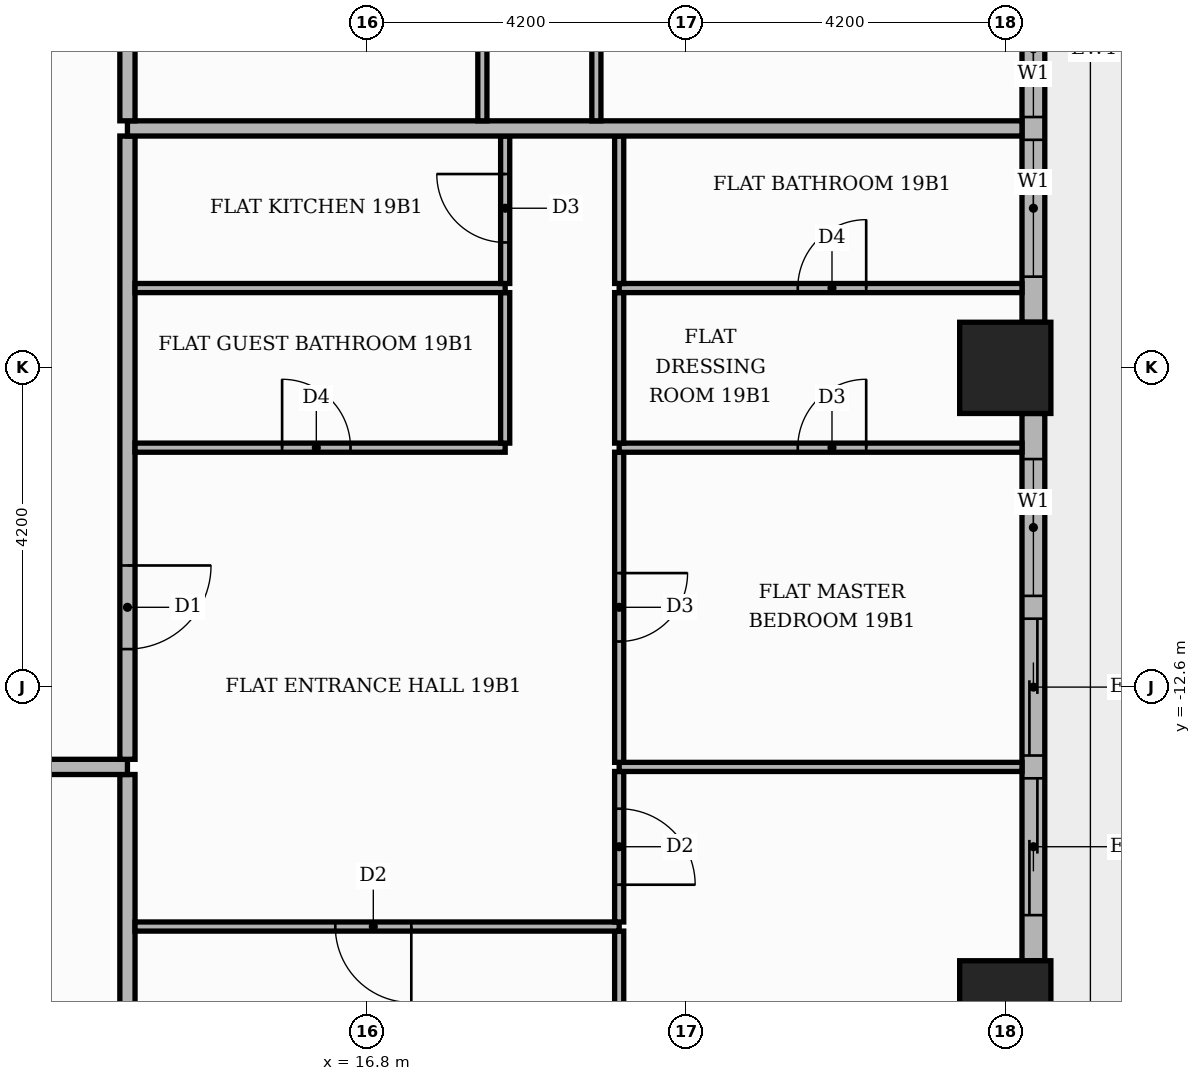
"""IFC4 building model, lengths in metres.
Left out: names, types, materials, properties, quantities, classifications, styles, units other than length and angle.
Written with IfcOpenShell. Run it as: python <this file> out.ifc"""

import sys

from ifc_helpers import new_model, si_unit, direction, frame, frame_2d, origin, origin_2d, place, context, subcontext, project, spatial, rectangle, extrude, element, fill, save


model = new_model("IFC4")
c1 = context("Model", 3, precision=1e-05, world=origin(), true_north=direction((0.0, 1.0)))
c2 = subcontext(c1, "Body", "Model", "MODEL_VIEW")
j1 = project(units=[si_unit("LENGTHUNIT", "METRE"), si_unit("PLANEANGLEUNIT", "RADIAN")], contexts=[c1])
p1 = place(None, origin())
s1 = spatial("IfcSite", under=j1, at=p1, CompositionType="ELEMENT")
p2 = place(p1, origin())
s2 = spatial("IfcBuilding", under=s1, at=p2, CompositionType="ELEMENT")
p3 = place(p2, frame((0.0, 0.0, 83.1)))
s3 = spatial("IfcBuildingStorey", under=s2, at=p3, CompositionType="ELEMENT", Elevation=83.1)
for number, where, z_axis, x_axis in (
    (1, (25.2, -8.4, 0.0), (0.0, 0.0, 1.0), (1.0, 0.0, 0.0)),
    (2, (25.2, -16.8, 0.0), (0.0, 0.0, 1.0), (1.0, 0.0, 0.0)),
):
    element("IfcColumn", number, at=place(p3, frame(where, z_axis=z_axis, x_axis=x_axis)), inside=s3, PredefinedType="COLUMN", context=c2, shape_type="SweptSolid", body=[
        extrude(rectangle(XDim=1.2, YDim=1.2, at=origin_2d()), origin(), (0.0, 0.0, 1.0), 3.9),
    ])
p4 = place(p3, frame((25.57, -16.2, 0.0), z_axis=(0.0, 0.0, 1.0), x_axis=(0.0, 1.0, 0.0)))
e3 = element("IfcWall", 3, at=p4, inside=s3, PredefinedType="STANDARD", context=c2, shape_type="SweptSolid", body=[
    extrude(rectangle(XDim=7.2, YDim=0.3, at=frame_2d((3.6, 0.0))), origin(), (0.0, 0.0, 1.0), 3.48),
])
p5 = place(p4, frame((0.6, 0.0, 0.0)))
e4 = element("IfcOpeningElement", 4, at=p5, cuts=e3, PredefinedType="OPENING", context=c2, shape_type="SweptSolid", body=[
    extrude(rectangle(XDim=1.8, YDim=2.4, at=frame_2d((0.9, 1.2))), frame((0.0, 0.16, 0.0), z_axis=(0.0, -1.0, 0.0), x_axis=(1.0, 0.0, 0.0)), (0.0, 0.0, 1.0), 0.32),
])
p6 = place(p4, frame((2.7, 0.0, 0.0)))
e5 = element("IfcOpeningElement", 5, at=p6, cuts=e3, PredefinedType="OPENING", context=c2, shape_type="SweptSolid", body=[
    extrude(rectangle(XDim=1.8, YDim=2.4, at=frame_2d((0.9, 1.2))), frame((0.0, 0.16, 0.0), z_axis=(0.0, -1.0, 0.0), x_axis=(1.0, 0.0, 0.0)), (0.0, 0.0, 1.0), 0.32),
])
p7 = place(p4, frame((4.8, 0.0, 0.9)))
e6 = element("IfcOpeningElement", 6, at=p7, cuts=e3, PredefinedType="OPENING", context=c2, shape_type="SweptSolid", body=[
    extrude(rectangle(XDim=1.8, YDim=2.1, at=frame_2d((0.9, 1.05))), frame((0.0, 0.16, 0.0), z_axis=(0.0, -1.0, 0.0), x_axis=(1.0, 0.0, 0.0)), (0.0, 0.0, 1.0), 0.32),
])
p8 = place(p3, frame((25.57, -7.8, 0.0), z_axis=(0.0, 0.0, 1.0), x_axis=(0.0, 1.0, 0.0)))
e7 = element("IfcWall", 7, at=p8, inside=s3, PredefinedType="STANDARD", context=c2, shape_type="SweptSolid", body=[
    extrude(rectangle(XDim=7.2, YDim=0.3, at=frame_2d((3.6, 0.0))), origin(), (0.0, 0.0, 1.0), 3.48),
])
p9 = place(p8, frame((0.6, 0.0, 0.9)))
e8 = element("IfcOpeningElement", 8, at=p9, cuts=e7, PredefinedType="OPENING", context=c2, shape_type="SweptSolid", body=[
    extrude(rectangle(XDim=1.8, YDim=2.1, at=frame_2d((0.9, 1.05))), frame((0.0, 0.16, 0.0), z_axis=(0.0, -1.0, 0.0), x_axis=(1.0, 0.0, 0.0)), (0.0, 0.0, 1.0), 0.32),
])
p10 = place(p8, frame((2.7, 0.0, 0.9)))
e9 = element("IfcOpeningElement", 9, at=p10, cuts=e7, PredefinedType="OPENING", context=c2, shape_type="SweptSolid", body=[
    extrude(rectangle(XDim=1.8, YDim=2.1, at=frame_2d((0.9, 1.05))), frame((0.0, 0.16, 0.0), z_axis=(0.0, -1.0, 0.0), x_axis=(1.0, 0.0, 0.0)), (0.0, 0.0, 1.0), 0.32),
])
p11 = place(p8, frame((4.8, 0.0, 0.0)))
e10 = element("IfcOpeningElement", 10, at=p11, cuts=e7, PredefinedType="OPENING", context=c2, shape_type="SweptSolid", body=[
    extrude(rectangle(XDim=1.8, YDim=2.4, at=frame_2d((0.9, 1.2))), frame((0.0, 0.16, 0.0), z_axis=(0.0, -1.0, 0.0), x_axis=(1.0, 0.0, 0.0)), (0.0, 0.0, 1.0), 0.32),
])
p12 = place(p3, frame((13.65, -25.42, 0.0), z_axis=(0.0, 0.0, 1.0), x_axis=(0.0, 1.0, 0.0)))
e11 = element("IfcWall", 11, at=p12, inside=s3, PredefinedType="PARTITIONING", context=c2, shape_type="SweptSolid", body=[
    extrude(rectangle(XDim=11.67, YDim=0.2, at=frame_2d((5.835, 0.0))), origin(), (0.0, 0.0, 1.0), 3.48),
])
p13 = place(p3, frame((20.12, -17.4, 0.0), z_axis=(0.0, 0.0, 1.0), x_axis=(0.0, 1.0, 0.0)))
e12 = element("IfcWall", 12, at=p13, inside=s3, PredefinedType="PARTITIONING", context=c2, shape_type="SweptSolid", body=[
    extrude(rectangle(XDim=1.59, YDim=0.12, at=frame_2d((0.795, 0.0))), origin(), (0.0, 0.0, 1.0), 3.48),
])
p14 = place(p3, frame((13.75, -15.75, 0.0), z_axis=(0.0, 0.0, 1.0), x_axis=(1.0, 0.0, 0.0)))
e13 = element("IfcWall", 13, at=p14, inside=s3, PredefinedType="PARTITIONING", context=c2, shape_type="SweptSolid", body=[
    extrude(rectangle(XDim=6.37, YDim=0.12, at=frame_2d((3.185, 0.0))), origin(), (0.0, 0.0, 1.0), 3.48),
])
p15 = place(p14, frame((2.635, 0.0, 0.0)))
e14 = element("IfcOpeningElement", 14, at=p15, cuts=e13, PredefinedType="OPENING", context=c2, shape_type="SweptSolid", body=[
    extrude(rectangle(XDim=1.0, YDim=2.1, at=frame_2d((0.5, 1.05))), frame((0.0, 0.07, 0.0), z_axis=(0.0, -1.0, 0.0), x_axis=(1.0, 0.0, 0.0)), (0.0, 0.0, 1.0), 0.14),
])
p16 = place(p3, frame((20.12, -15.69, 0.0), z_axis=(0.0, 0.0, 1.0), x_axis=(0.0, 1.0, 0.0)))
e15 = element("IfcWall", 15, at=p16, inside=s3, PredefinedType="PARTITIONING", context=c2, shape_type="SweptSolid", body=[
    extrude(rectangle(XDim=1.98, YDim=0.12, at=frame_2d((0.99, 0.0))), origin(), (0.0, 0.0, 1.0), 3.48),
])
p17 = place(p16, frame((0.49, 0.0, 0.0)))
e16 = element("IfcOpeningElement", 16, at=p17, cuts=e15, PredefinedType="OPENING", context=c2, shape_type="SweptSolid", body=[
    extrude(rectangle(XDim=1.0, YDim=2.1, at=frame_2d((0.5, 1.05))), frame((0.0, 0.07, 0.0), z_axis=(0.0, -1.0, 0.0), x_axis=(1.0, 0.0, 0.0)), (0.0, 0.0, 1.0), 0.14),
])
p18 = place(p3, frame((-25.42, -13.65, 0.0), z_axis=(0.0, 0.0, 1.0), x_axis=(1.0, 0.0, 0.0)))
e17 = element("IfcWall", 17, at=p18, inside=s3, PredefinedType="PARTITIONING", context=c2, shape_type="SweptSolid", body=[
    extrude(rectangle(XDim=39.07, YDim=0.2, at=frame_2d((19.535, 0.0))), origin(), (0.0, 0.0, 1.0), 3.48),
])
p19 = place(p18, frame((14.37, 0.0, 0.0)))
e18 = element("IfcOpeningElement", 18, at=p19, cuts=e17, PredefinedType="OPENING", context=c2, shape_type="SweptSolid", body=[
    extrude(rectangle(XDim=1.1, YDim=2.4, at=frame_2d((0.55, 1.2))), frame((0.0, 0.11, 0.0), z_axis=(0.0, -1.0, 0.0), x_axis=(1.0, 0.0, 0.0)), (0.0, 0.0, 1.0), 0.22),
])
p20 = place(p3, frame((20.12, -13.65, 0.0), z_axis=(0.0, 0.0, 1.0), x_axis=(1.0, 0.0, 0.0)))
e19 = element("IfcWall", 19, at=p20, inside=s3, PredefinedType="PARTITIONING", context=c2, shape_type="SweptSolid", body=[
    extrude(rectangle(XDim=5.3, YDim=0.12, at=frame_2d((2.65, 0.0))), origin(), (0.0, 0.0, 1.0), 3.48),
])
p21 = place(p3, frame((20.12, -13.59, 0.0), z_axis=(0.0, 0.0, 1.0), x_axis=(0.0, 1.0, 0.0)))
e20 = element("IfcWall", 20, at=p21, inside=s3, PredefinedType="PARTITIONING", context=c2, shape_type="SweptSolid", body=[
    extrude(rectangle(XDim=4.08, YDim=0.12, at=frame_2d((2.04, 0.0))), origin(), (0.0, 0.0, 1.0), 3.48),
])
p22 = place(p21, frame((1.59, 0.0, 0.0)))
e21 = element("IfcOpeningElement", 21, at=p22, cuts=e20, PredefinedType="OPENING", context=c2, shape_type="SweptSolid", body=[
    extrude(rectangle(XDim=0.9, YDim=2.1, at=frame_2d((0.45, 1.05))), frame((0.0, 0.07, 0.0), z_axis=(0.0, -1.0, 0.0), x_axis=(1.0, 0.0, 0.0)), (0.0, 0.0, 1.0), 0.14),
])
p23 = place(p3, frame((13.65, -13.55, 0.0), z_axis=(0.0, 0.0, 1.0), x_axis=(0.0, 1.0, 0.0)))
e22 = element("IfcWall", 22, at=p23, inside=s3, PredefinedType="PARTITIONING", context=c2, shape_type="SweptSolid", body=[
    extrude(rectangle(XDim=8.2, YDim=0.2, at=frame_2d((4.1, 0.0))), origin(), (0.0, 0.0, 1.0), 3.48),
])
p24 = place(p23, frame((1.45, 0.0, 0.0)))
e23 = element("IfcOpeningElement", 23, at=p24, cuts=e22, PredefinedType="OPENING", context=c2, shape_type="SweptSolid", body=[
    extrude(rectangle(XDim=1.1, YDim=2.4, at=frame_2d((0.55, 1.2))), frame((0.0, 0.11, 0.0), z_axis=(0.0, -1.0, 0.0), x_axis=(1.0, 0.0, 0.0)), (0.0, 0.0, 1.0), 0.22),
])
p25 = place(p3, frame((13.75, -9.45, 0.0), z_axis=(0.0, 0.0, 1.0), x_axis=(1.0, 0.0, 0.0)))
e24 = element("IfcWall", 24, at=p25, inside=s3, PredefinedType="PARTITIONING", context=c2, shape_type="SweptSolid", body=[
    extrude(rectangle(XDim=4.87, YDim=0.12, at=frame_2d((2.435, 0.0))), origin(), (0.0, 0.0, 1.0), 3.48),
])
p26 = place(p25, frame((1.935, 0.0, 0.0)))
e25 = element("IfcOpeningElement", 25, at=p26, cuts=e24, PredefinedType="OPENING", context=c2, shape_type="SweptSolid", body=[
    extrude(rectangle(XDim=0.9, YDim=2.1, at=frame_2d((0.45, 1.05))), frame((0.0, 0.07, 0.0), z_axis=(0.0, -1.0, 0.0), x_axis=(1.0, 0.0, 0.0)), (0.0, 0.0, 1.0), 0.14),
])
p27 = place(p3, frame((20.12, -9.45, 0.0), z_axis=(0.0, 0.0, 1.0), x_axis=(1.0, 0.0, 0.0)))
e26 = element("IfcWall", 26, at=p27, inside=s3, PredefinedType="PARTITIONING", context=c2, shape_type="SweptSolid", body=[
    extrude(rectangle(XDim=5.3, YDim=0.12, at=frame_2d((2.65, 0.0))), origin(), (0.0, 0.0, 1.0), 3.48),
])
p28 = place(p27, frame((2.35, 0.0, 0.0)))
e27 = element("IfcOpeningElement", 27, at=p28, cuts=e26, PredefinedType="OPENING", context=c2, shape_type="SweptSolid", body=[
    extrude(rectangle(XDim=0.9, YDim=2.1, at=frame_2d((0.45, 1.05))), frame((0.0, 0.07, 0.0), z_axis=(0.0, -1.0, 0.0), x_axis=(1.0, 0.0, 0.0)), (0.0, 0.0, 1.0), 0.14),
])
for number, where, z_axis, x_axis in (
    (28, (18.62, -9.39, 0.0), (0.0, 0.0, 1.0), (0.0, 1.0, 0.0)),
    (29, (20.12, -9.39, 0.0), (0.0, 0.0, 1.0), (0.0, 1.0, 0.0)),
):
    element("IfcWall", number, at=place(p3, frame(where, z_axis=z_axis, x_axis=x_axis)), inside=s3, PredefinedType="PARTITIONING", context=c2, shape_type="SweptSolid", body=[
        extrude(rectangle(XDim=1.98, YDim=0.12, at=frame_2d((0.99, 0.0))), origin(), (0.0, 0.0, 1.0), 3.48),
    ])
p29 = place(p3, frame((13.75, -7.35, 0.0), z_axis=(0.0, 0.0, 1.0), x_axis=(1.0, 0.0, 0.0)))
e30 = element("IfcWall", 30, at=p29, inside=s3, PredefinedType="PARTITIONING", context=c2, shape_type="SweptSolid", body=[
    extrude(rectangle(XDim=4.87, YDim=0.12, at=frame_2d((2.435, 0.0))), origin(), (0.0, 0.0, 1.0), 3.48),
])
p30 = place(p3, frame((20.12, -7.35, 0.0), z_axis=(0.0, 0.0, 1.0), x_axis=(1.0, 0.0, 0.0)))
e31 = element("IfcWall", 31, at=p30, inside=s3, PredefinedType="PARTITIONING", context=c2, shape_type="SweptSolid", body=[
    extrude(rectangle(XDim=5.3, YDim=0.12, at=frame_2d((2.65, 0.0))), origin(), (0.0, 0.0, 1.0), 3.48),
])
p31 = place(p30, frame((2.35, 0.0, 0.0)))
e32 = element("IfcOpeningElement", 32, at=p31, cuts=e31, PredefinedType="OPENING", context=c2, shape_type="SweptSolid", body=[
    extrude(rectangle(XDim=0.9, YDim=2.1, at=frame_2d((0.45, 1.05))), frame((0.0, 0.07, 0.0), z_axis=(0.0, -1.0, 0.0), x_axis=(1.0, 0.0, 0.0)), (0.0, 0.0, 1.0), 0.14),
])
p32 = place(p3, frame((18.62, -7.29, 0.0), z_axis=(0.0, 0.0, 1.0), x_axis=(0.0, 1.0, 0.0)))
e33 = element("IfcWall", 33, at=p32, inside=s3, PredefinedType="PARTITIONING", context=c2, shape_type="SweptSolid", body=[
    extrude(rectangle(XDim=1.94, YDim=0.12, at=frame_2d((0.97, 0.0))), origin(), (0.0, 0.0, 1.0), 3.48),
])
p33 = place(p32, frame((0.54, 0.0, 0.0)))
e34 = element("IfcOpeningElement", 34, at=p33, cuts=e33, PredefinedType="OPENING", context=c2, shape_type="SweptSolid", body=[
    extrude(rectangle(XDim=0.9, YDim=2.1, at=frame_2d((0.45, 1.05))), frame((0.0, 0.07, 0.0), z_axis=(0.0, -1.0, 0.0), x_axis=(1.0, 0.0, 0.0)), (0.0, 0.0, 1.0), 0.14),
])
p34 = place(p3, frame((20.12, -7.29, 0.0), z_axis=(0.0, 0.0, 1.0), x_axis=(0.0, 1.0, 0.0)))
e35 = element("IfcWall", 35, at=p34, inside=s3, PredefinedType="PARTITIONING", context=c2, shape_type="SweptSolid", body=[
    extrude(rectangle(XDim=1.94, YDim=0.12, at=frame_2d((0.97, 0.0))), origin(), (0.0, 0.0, 1.0), 3.48),
])
p35 = place(p3, frame((13.65, -5.25, 0.0), z_axis=(0.0, 0.0, 1.0), x_axis=(1.0, 0.0, 0.0)))
e36 = element("IfcWall", 36, at=p35, inside=s3, PredefinedType="PARTITIONING", context=c2, shape_type="SweptSolid", body=[
    extrude(rectangle(XDim=11.77, YDim=0.2, at=frame_2d((5.885, 0.0))), origin(), (0.0, 0.0, 1.0), 3.48),
])
p36 = place(p3, frame((13.65, -5.15, 0.0), z_axis=(0.0, 0.0, 1.0), x_axis=(0.0, 1.0, 0.0)))
e37 = element("IfcWall", 37, at=p36, inside=s3, PredefinedType="PARTITIONING", context=c2, shape_type="SweptSolid", body=[
    extrude(rectangle(XDim=18.7, YDim=0.2, at=frame_2d((9.35, 0.0))), origin(), (0.0, 0.0, 1.0), 3.48),
])
p37 = place(p36, frame((5.65, 0.0, 0.0)))
e38 = element("IfcOpeningElement", 38, at=p37, cuts=e37, PredefinedType="OPENING", context=c2, shape_type="SweptSolid", body=[
    extrude(rectangle(XDim=1.1, YDim=2.4, at=frame_2d((0.55, 1.2))), frame((0.0, 0.11, 0.0), z_axis=(0.0, -1.0, 0.0), x_axis=(1.0, 0.0, 0.0)), (0.0, 0.0, 1.0), 0.22),
])
p38 = place(p3, frame((18.32, -5.15, 0.0), z_axis=(0.0, 0.0, 1.0), x_axis=(0.0, 1.0, 0.0)))
e39 = element("IfcWall", 39, at=p38, inside=s3, PredefinedType="PARTITIONING", context=c2, shape_type="SweptSolid", body=[
    extrude(rectangle(XDim=4.04, YDim=0.12, at=frame_2d((2.02, 0.0))), origin(), (0.0, 0.0, 1.0), 3.48),
])
p39 = place(p3, frame((19.82, -5.15, 0.0), z_axis=(0.0, 0.0, 1.0), x_axis=(0.0, 1.0, 0.0)))
e40 = element("IfcWall", 40, at=p39, inside=s3, PredefinedType="PARTITIONING", context=c2, shape_type="SweptSolid", body=[
    extrude(rectangle(XDim=8.24, YDim=0.12, at=frame_2d((4.12, 0.0))), origin(), (0.0, 0.0, 1.0), 3.48),
])
p40 = place(p39, frame((3.6, 0.0, 0.0)))
e41 = element("IfcOpeningElement", 41, at=p40, cuts=e40, PredefinedType="OPENING", context=c2, shape_type="SweptSolid", body=[
    extrude(rectangle(XDim=1.0, YDim=2.1, at=frame_2d((0.5, 1.05))), frame((0.0, 0.07, 0.0), z_axis=(0.0, -1.0, 0.0), x_axis=(1.0, 0.0, 0.0)), (0.0, 0.0, 1.0), 0.14),
])
p41 = place(p5, origin())
e42 = element("IfcDoor", 42, at=p41, inside=s3, OperationType="SLIDING_TO_LEFT", PredefinedType="DOOR", context=c2, shape_type="SweptSolid", body=[
    extrude(rectangle(XDim=1.8, YDim=2.4, at=frame_2d((0.9, 1.2))), frame((0.0, 0.025, 0.0), z_axis=(0.0, -1.0, 0.0), x_axis=(1.0, 0.0, 0.0)), (0.0, 0.0, 1.0), 0.05),
])
fill(e4, e42)
p42 = place(p6, origin())
e43 = element("IfcDoor", 43, at=p42, inside=s3, OperationType="SLIDING_TO_RIGHT", PredefinedType="DOOR", context=c2, shape_type="SweptSolid", body=[
    extrude(rectangle(XDim=1.8, YDim=2.4, at=frame_2d((0.9, 1.2))), frame((0.0, 0.025, 0.0), z_axis=(0.0, -1.0, 0.0), x_axis=(1.0, 0.0, 0.0)), (0.0, 0.0, 1.0), 0.05),
])
fill(e5, e43)
p43 = place(p7, origin())
e44 = element("IfcWindow", 44, at=p43, inside=s3, PartitioningType="SINGLE_PANEL", PredefinedType="WINDOW", context=c2, shape_type="SweptSolid", body=[
    extrude(rectangle(XDim=1.8, YDim=2.1, at=frame_2d((0.9, 1.05))), frame((0.0, 0.03, 0.0), z_axis=(0.0, -1.0, 0.0), x_axis=(1.0, 0.0, 0.0)), (0.0, 0.0, 1.0), 0.06),
])
fill(e6, e44)
p44 = place(p9, origin())
e45 = element("IfcWindow", 45, at=p44, inside=s3, PartitioningType="SINGLE_PANEL", PredefinedType="WINDOW", context=c2, shape_type="SweptSolid", body=[
    extrude(rectangle(XDim=1.8, YDim=2.1, at=frame_2d((0.9, 1.05))), frame((0.0, 0.03, 0.0), z_axis=(0.0, -1.0, 0.0), x_axis=(1.0, 0.0, 0.0)), (0.0, 0.0, 1.0), 0.06),
])
fill(e8, e45)
p45 = place(p10, origin())
e46 = element("IfcWindow", 46, at=p45, inside=s3, PartitioningType="SINGLE_PANEL", PredefinedType="WINDOW", context=c2, shape_type="SweptSolid", body=[
    extrude(rectangle(XDim=1.8, YDim=2.1, at=frame_2d((0.9, 1.05))), frame((0.0, 0.03, 0.0), z_axis=(0.0, -1.0, 0.0), x_axis=(1.0, 0.0, 0.0)), (0.0, 0.0, 1.0), 0.06),
])
fill(e9, e46)
p46 = place(p24, frame((1.1, 0.0, 0.0), z_axis=(0.0, 0.0, 1.0), x_axis=(-1.0, 0.0, 0.0)))
e47 = element("IfcDoor", 47, at=p46, inside=s3, OperationType="SINGLE_SWING_RIGHT", PredefinedType="DOOR", context=c2, shape_type="SweptSolid", body=[
    extrude(rectangle(XDim=1.1, YDim=2.4, at=frame_2d((0.55, 1.2))), frame((0.0, 0.025, 0.0), z_axis=(0.0, -1.0, 0.0), x_axis=(1.0, 0.0, 0.0)), (0.0, 0.0, 1.0), 0.05),
])
fill(e23, e47)
p47 = place(p15, frame((1.0, 0.0, 0.0), z_axis=(0.0, 0.0, 1.0), x_axis=(-1.0, 0.0, 0.0)))
e48 = element("IfcDoor", 48, at=p47, inside=s3, OperationType="SINGLE_SWING_RIGHT", PredefinedType="DOOR", context=c2, shape_type="SweptSolid", body=[
    extrude(rectangle(XDim=1.0, YDim=2.1, at=frame_2d((0.5, 1.05))), frame((0.0, 0.025, 0.0), z_axis=(0.0, -1.0, 0.0), x_axis=(1.0, 0.0, 0.0)), (0.0, 0.0, 1.0), 0.05),
])
fill(e14, e48)
p48 = place(p26, origin())
e49 = element("IfcDoor", 49, at=p48, inside=s3, OperationType="SINGLE_SWING_LEFT", PredefinedType="DOOR", context=c2, shape_type="SweptSolid", body=[
    extrude(rectangle(XDim=0.9, YDim=2.1, at=frame_2d((0.45, 1.05))), frame((0.0, 0.025, 0.0), z_axis=(0.0, -1.0, 0.0), x_axis=(1.0, 0.0, 0.0)), (0.0, 0.0, 1.0), 0.05),
])
fill(e25, e49)
p49 = place(p33, origin())
e50 = element("IfcDoor", 50, at=p49, inside=s3, OperationType="SINGLE_SWING_RIGHT", PredefinedType="DOOR", context=c2, shape_type="SweptSolid", body=[
    extrude(rectangle(XDim=0.9, YDim=2.1, at=frame_2d((0.45, 1.05))), frame((0.0, 0.025, 0.0), z_axis=(0.0, -1.0, 0.0), x_axis=(1.0, 0.0, 0.0)), (0.0, 0.0, 1.0), 0.05),
])
fill(e34, e50)
p50 = place(p17, frame((1.0, 0.0, 0.0), z_axis=(0.0, 0.0, 1.0), x_axis=(-1.0, 0.0, 0.0)))
e51 = element("IfcDoor", 51, at=p50, inside=s3, OperationType="SINGLE_SWING_LEFT", PredefinedType="DOOR", context=c2, shape_type="SweptSolid", body=[
    extrude(rectangle(XDim=1.0, YDim=2.1, at=frame_2d((0.5, 1.05))), frame((0.0, 0.025, 0.0), z_axis=(0.0, -1.0, 0.0), x_axis=(1.0, 0.0, 0.0)), (0.0, 0.0, 1.0), 0.05),
])
fill(e16, e51)
p51 = place(p22, frame((0.9, 0.0, 0.0), z_axis=(0.0, 0.0, 1.0), x_axis=(-1.0, 0.0, 0.0)))
e52 = element("IfcDoor", 52, at=p51, inside=s3, OperationType="SINGLE_SWING_RIGHT", PredefinedType="DOOR", context=c2, shape_type="SweptSolid", body=[
    extrude(rectangle(XDim=0.9, YDim=2.1, at=frame_2d((0.45, 1.05))), frame((0.0, 0.025, 0.0), z_axis=(0.0, -1.0, 0.0), x_axis=(1.0, 0.0, 0.0)), (0.0, 0.0, 1.0), 0.05),
])
fill(e21, e52)
p52 = place(p28, origin())
e53 = element("IfcDoor", 53, at=p52, inside=s3, OperationType="SINGLE_SWING_RIGHT", PredefinedType="DOOR", context=c2, shape_type="SweptSolid", body=[
    extrude(rectangle(XDim=0.9, YDim=2.1, at=frame_2d((0.45, 1.05))), frame((0.0, 0.025, 0.0), z_axis=(0.0, -1.0, 0.0), x_axis=(1.0, 0.0, 0.0)), (0.0, 0.0, 1.0), 0.05),
])
fill(e27, e53)
p53 = place(p31, origin())
e54 = element("IfcDoor", 54, at=p53, inside=s3, OperationType="SINGLE_SWING_RIGHT", PredefinedType="DOOR", context=c2, shape_type="SweptSolid", body=[
    extrude(rectangle(XDim=0.9, YDim=2.1, at=frame_2d((0.45, 1.05))), frame((0.0, 0.025, 0.0), z_axis=(0.0, -1.0, 0.0), x_axis=(1.0, 0.0, 0.0)), (0.0, 0.0, 1.0), 0.05),
])
fill(e32, e54)
save(model, sys.argv[1])
